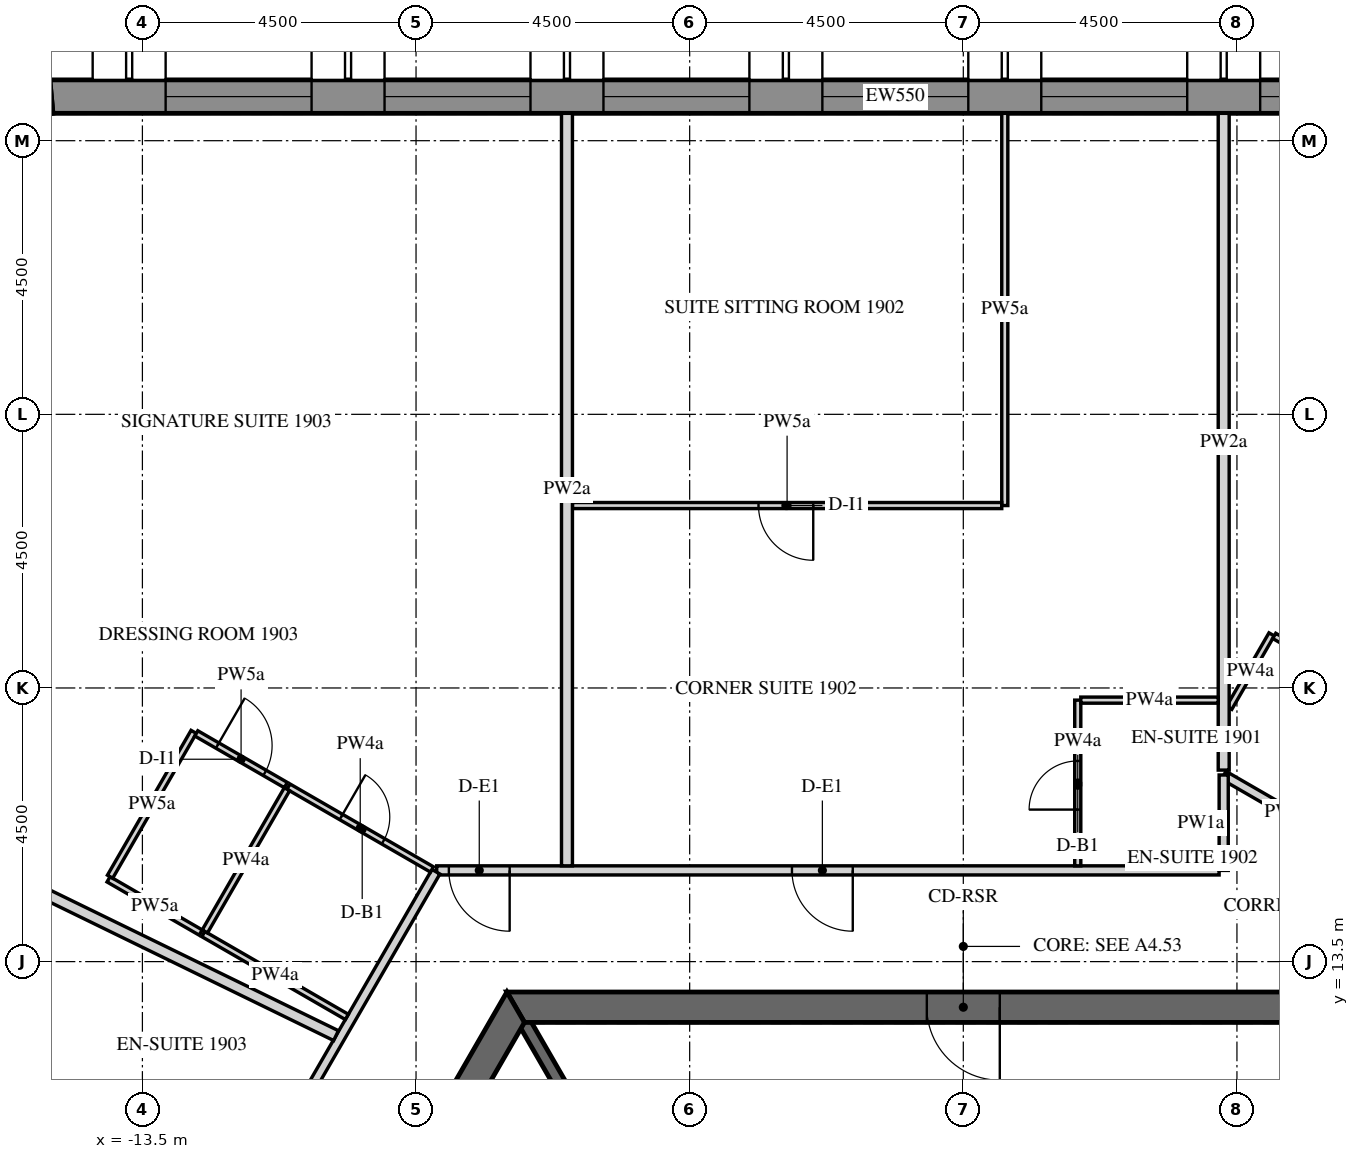
"""IFC4 building model, lengths in metres.
Left out: names, types, materials, properties, quantities, classifications, styles, units other than length and angle.
Written with IfcOpenShell. Run it as: python <this file> out.ifc"""

import sys

from ifc_helpers import new_model, si_unit, direction, frame, frame_2d, origin, place, context, subcontext, project, spatial, polyline, rectangle, outline, extrude, element, fill, save


model = new_model("IFC4")
c1 = context("Model", 3, precision=1e-05, world=origin(), true_north=direction((0.0, 1.0)))
c2 = subcontext(c1, "Body", "Model", "MODEL_VIEW")
j1 = project(units=[si_unit("LENGTHUNIT", "METRE"), si_unit("PLANEANGLEUNIT", "RADIAN")], contexts=[c1])
p1 = place(None, origin())
s1 = spatial("IfcSite", under=j1, at=p1, CompositionType="ELEMENT")
p2 = place(p1, origin())
s2 = spatial("IfcBuilding", under=s1, at=p2, CompositionType="ELEMENT")
p3 = place(p2, frame((0.0, 0.0, 238.5)))
s3 = spatial("IfcBuildingStorey", under=s2, at=p3, CompositionType="ELEMENT", Elevation=238.5)
p4 = place(p3, frame((12.761, 27.725, -0.15), z_axis=(0.0, 0.0, 1.0), x_axis=(-1.0, 0.0, 0.0)))
e1 = element("IfcWall", 1, at=p4, inside=s3, PredefinedType="SOLIDWALL", context=c2, shape_type="SweptSolid", body=[
    extrude(outline(polyline([(-0.022, -0.275), (27.783, -0.275), (27.732, 0.275), (0.022, 0.275), (-0.022, -0.275)])), origin(), (0.0, 0.0, 1.0), 3.9),
])
p5 = place(p4, frame((1.879, 0.0, 1.05)))
e2 = element("IfcOpeningElement", 2, at=p5, cuts=e1, PredefinedType="OPENING", context=c2, shape_type="SweptSolid", body=[
    extrude(rectangle(XDim=2.4, YDim=2.4, at=frame_2d((1.2, 1.2))), frame((0.0, 0.285, 0.0), z_axis=(0.0, -1.0, 0.0), x_axis=(1.0, 0.0, 0.0)), (0.0, 0.0, 1.0), 0.57),
])
p6 = place(p4, frame((5.479, 0.0, 1.05)))
e3 = element("IfcOpeningElement", 3, at=p6, cuts=e1, PredefinedType="OPENING", context=c2, shape_type="SweptSolid", body=[
    extrude(rectangle(XDim=2.4, YDim=2.4, at=frame_2d((1.2, 1.2))), frame((0.0, 0.285, 0.0), z_axis=(0.0, -1.0, 0.0), x_axis=(1.0, 0.0, 0.0)), (0.0, 0.0, 1.0), 0.57),
])
p7 = place(p4, frame((9.079, 0.0, 1.05)))
e4 = element("IfcOpeningElement", 4, at=p7, cuts=e1, PredefinedType="OPENING", context=c2, shape_type="SweptSolid", body=[
    extrude(rectangle(XDim=2.4, YDim=2.4, at=frame_2d((1.2, 1.2))), frame((0.0, 0.285, 0.0), z_axis=(0.0, -1.0, 0.0), x_axis=(1.0, 0.0, 0.0)), (0.0, 0.0, 1.0), 0.57),
])
p8 = place(p4, frame((12.679, 0.0, 1.05)))
e5 = element("IfcOpeningElement", 5, at=p8, cuts=e1, PredefinedType="OPENING", context=c2, shape_type="SweptSolid", body=[
    extrude(rectangle(XDim=2.4, YDim=2.4, at=frame_2d((1.2, 1.2))), frame((0.0, 0.285, 0.0), z_axis=(0.0, -1.0, 0.0), x_axis=(1.0, 0.0, 0.0)), (0.0, 0.0, 1.0), 0.57),
])
p9 = place(p4, frame((16.279, 0.0, 1.05)))
e6 = element("IfcOpeningElement", 6, at=p9, cuts=e1, PredefinedType="OPENING", context=c2, shape_type="SweptSolid", body=[
    extrude(rectangle(XDim=2.4, YDim=2.4, at=frame_2d((1.2, 1.2))), frame((0.0, 0.285, 0.0), z_axis=(0.0, -1.0, 0.0), x_axis=(1.0, 0.0, 0.0)), (0.0, 0.0, 1.0), 0.57),
])
p10 = place(p4, frame((19.879, 0.0, 1.05)))
e7 = element("IfcOpeningElement", 7, at=p10, cuts=e1, PredefinedType="OPENING", context=c2, shape_type="SweptSolid", body=[
    extrude(rectangle(XDim=2.4, YDim=2.4, at=frame_2d((1.2, 1.2))), frame((0.0, 0.285, 0.0), z_axis=(0.0, -1.0, 0.0), x_axis=(1.0, 0.0, 0.0)), (0.0, 0.0, 1.0), 0.57),
])
p11 = place(p4, frame((23.479, 0.0, 1.05)))
e8 = element("IfcOpeningElement", 8, at=p11, cuts=e1, PredefinedType="OPENING", context=c2, shape_type="SweptSolid", body=[
    extrude(rectangle(XDim=2.4, YDim=2.4, at=frame_2d((1.2, 1.2))), frame((0.0, 0.285, 0.0), z_axis=(0.0, -1.0, 0.0), x_axis=(1.0, 0.0, 0.0)), (0.0, 0.0, 1.0), 0.57),
])
p12 = place(p3, frame((-14.997, 27.725, -0.15), z_axis=(0.0, 0.0, 1.0), x_axis=(-0.982705443133, -0.185175624845, 0.0)))
e9 = element("IfcWall", 9, at=p12, inside=s3, PredefinedType="SOLIDWALL", context=c2, shape_type="SweptSolid", body=[
    extrude(outline(polyline([(-0.026, -0.275), (1.431, -0.275), (1.327, 0.275), (0.026, 0.275), (-0.026, -0.275)])), origin(), (0.0, 0.0, 1.0), 3.9),
])
p13 = place(p3, frame((-7.361, 12.75, -0.15), z_axis=(0.0, 0.0, 1.0), x_axis=(-0.50000571537, -0.866022103989, 0.0)))
e10 = element("IfcWall", 10, at=p13, inside=s3, PredefinedType="SHEAR", context=c2, shape_type="SweptSolid", body=[
    extrude(outline(polyline([(-0.144, -0.25), (14.867, -0.25), (14.578, 0.25), (0.144, 0.25), (-0.144, -0.25)])), origin(), (0.0, 0.0, 1.0), 3.9),
])
p14 = place(p13, frame((6.49, 0.0, 0.15)))
e11 = element("IfcOpeningElement", 11, at=p14, cuts=e10, PredefinedType="OPENING", context=c2, shape_type="SweptSolid", body=[
    extrude(rectangle(XDim=1.8, YDim=2.4, at=frame_2d((0.9, 1.2))), frame((0.0, 0.26, 0.0), z_axis=(0.0, -1.0, 0.0), x_axis=(1.0, 0.0, 0.0)), (0.0, 0.0, 1.0), 0.52),
])
p15 = place(p3, frame((7.361, 12.75, -0.15), z_axis=(0.0, 0.0, 1.0), x_axis=(-1.0, 0.0, 0.0)))
e12 = element("IfcWall", 12, at=p15, inside=s3, PredefinedType="SHEAR", context=c2, shape_type="SweptSolid", body=[
    extrude(outline(polyline([(-0.144, -0.25), (14.866, -0.25), (14.578, 0.25), (0.144, 0.25), (-0.144, -0.25)])), origin(), (0.0, 0.0, 1.0), 3.9),
])
p16 = place(p15, frame((6.761, 0.0, 0.15)))
e13 = element("IfcOpeningElement", 13, at=p16, cuts=e12, PredefinedType="OPENING", context=c2, shape_type="SweptSolid", body=[
    extrude(rectangle(XDim=1.2, YDim=2.4, at=frame_2d((0.6, 1.2))), frame((0.0, 0.26, 0.0), z_axis=(0.0, -1.0, 0.0), x_axis=(1.0, 0.0, 0.0)), (0.0, 0.0, 1.0), 0.52),
])
p17 = place(p3, frame((-5.773, 10.0, -0.15), z_axis=(0.0, 0.0, 1.0), x_axis=(-0.499995765644, 0.866027848477, 0.0)))
e14 = element("IfcWall", 14, at=p17, inside=s3, PredefinedType="SHEAR", context=c2, shape_type="SweptSolid", body=[
    extrude(rectangle(XDim=2.887, YDim=0.2, at=frame_2d((1.443, 0.0))), origin(), (0.0, 0.0, 1.0), 3.9),
])
p18 = place(p3, frame((6.403, 15.341, 0.0), z_axis=(0.0, 0.0, 1.0), x_axis=(-0.8660013066, 0.500041735226, 0.0)))
e15 = element("IfcWall", 15, at=p18, inside=s3, PredefinedType="PARTITIONING", context=c2, shape_type="SweptSolid", body=[
    extrude(rectangle(XDim=2.449, YDim=0.15, at=frame_2d((1.225, 0.0))), origin(), (0.0, 0.0, 1.0), 2.838),
])
p19 = place(p3, frame((4.207, 15.0, 0.0), z_axis=(0.0, 0.0, 1.0), x_axis=(-1.0, 0.0, 0.0)))
e16 = element("IfcWall", 16, at=p19, inside=s3, PredefinedType="PARTITIONING", context=c2, shape_type="SweptSolid", body=[
    extrude(rectangle(XDim=12.867, YDim=0.15, at=frame_2d((6.434, 0.0))), origin(), (0.0, 0.0, 1.0), 2.838),
])
p20 = place(p19, frame((6.025, 0.0, 0.0)))
e17 = element("IfcOpeningElement", 17, at=p20, cuts=e16, PredefinedType="OPENING", context=c2, shape_type="SweptSolid", body=[
    extrude(rectangle(XDim=1.0, YDim=2.1, at=frame_2d((0.5, 1.05))), frame((0.0, 0.085, 0.0), z_axis=(0.0, -1.0, 0.0), x_axis=(1.0, 0.0, 0.0)), (0.0, 0.0, 1.0), 0.17),
])
p21 = place(p19, frame((11.667, 0.0, 0.0)))
e18 = element("IfcOpeningElement", 18, at=p21, cuts=e16, PredefinedType="OPENING", context=c2, shape_type="SweptSolid", body=[
    extrude(rectangle(XDim=1.0, YDim=2.1, at=frame_2d((0.5, 1.05))), frame((0.0, 0.085, 0.0), z_axis=(0.0, -1.0, 0.0), x_axis=(1.0, 0.0, 0.0)), (0.0, 0.0, 1.0), 0.17),
])
p22 = place(p3, frame((4.282, 16.569, 0.0), z_axis=(0.0, 0.0, 1.0), x_axis=(0.0, -1.0, 0.0)))
e19 = element("IfcWall", 19, at=p22, inside=s3, PredefinedType="PARTITIONING", context=c2, shape_type="SweptSolid", body=[
    extrude(rectangle(XDim=1.569, YDim=0.15, at=frame_2d((0.785, 0.0))), origin(), (0.0, 0.0, 1.0), 2.838),
])
p23 = place(p3, frame((-8.673, 14.978, 0.0), z_axis=(0.0, 0.0, 1.0), x_axis=(-0.50000700621, -0.86602135871, 0.0)))
e20 = element("IfcWall", 20, at=p23, inside=s3, PredefinedType="PARTITIONING", context=c2, shape_type="SweptSolid", body=[
    extrude(rectangle(XDim=14.928, YDim=0.15, at=frame_2d((7.464, 0.0))), origin(), (0.0, 0.0, 1.0), 2.838),
])
p24 = place(p23, frame((4.454, 0.0, 0.0)))
e21 = element("IfcOpeningElement", 21, at=p24, cuts=e20, PredefinedType="OPENING", context=c2, shape_type="SweptSolid", body=[
    extrude(rectangle(XDim=1.0, YDim=2.1, at=frame_2d((0.5, 1.05))), frame((0.0, 0.085, 0.0), z_axis=(0.0, -1.0, 0.0), x_axis=(1.0, 0.0, 0.0)), (0.0, 0.0, 1.0), 0.17),
])
p25 = place(p23, frame((11.264, 0.0, 0.0)))
e22 = element("IfcOpeningElement", 22, at=p25, cuts=e20, PredefinedType="OPENING", context=c2, shape_type="SweptSolid", body=[
    extrude(rectangle(XDim=1.0, YDim=2.1, at=frame_2d((0.5, 1.05))), frame((0.0, 0.085, 0.0), z_axis=(0.0, -1.0, 0.0), x_axis=(1.0, 0.0, 0.0)), (0.0, 0.0, 1.0), 0.17),
])
p26 = place(p3, frame((4.372, 17.673, 0.0), z_axis=(0.0, 0.0, 1.0), x_axis=(0.50007068215, 0.86598459158, 0.0)))
e23 = element("IfcWall", 23, at=p26, inside=s3, PredefinedType="PARTITIONING", context=c2, shape_type="SweptSolid", body=[
    extrude(rectangle(XDim=1.396, YDim=0.1, at=frame_2d((0.698, 0.0))), origin(), (0.0, 0.0, 1.0), 2.838),
])
p27 = place(p3, frame((5.113, 18.857, 0.0), z_axis=(0.0, 0.0, 1.0), x_axis=(0.866039941686, -0.499974818771, 0.0)))
e24 = element("IfcWall", 24, at=p27, inside=s3, PredefinedType="PARTITIONING", context=c2, shape_type="SweptSolid", body=[
    extrude(rectangle(XDim=2.875, YDim=0.1, at=frame_2d((1.438, 0.0))), origin(), (0.0, 0.0, 1.0), 2.838),
])
p28 = place(p27, frame((1.05, 0.0, 0.0)))
e25 = element("IfcOpeningElement", 25, at=p28, cuts=e24, PredefinedType="OPENING", context=c2, shape_type="SweptSolid", body=[
    extrude(rectangle(XDim=0.8, YDim=2.1, at=frame_2d((0.4, 1.05))), frame((0.0, 0.06, 0.0), z_axis=(0.0, -1.0, 0.0), x_axis=(1.0, 0.0, 0.0)), (0.0, 0.0, 1.0), 0.12),
])
p29 = place(p3, frame((4.282, 27.45, 0.0), z_axis=(0.0, 0.0, 1.0), x_axis=(0.0, -1.0, 0.0)))
e26 = element("IfcWall", 26, at=p29, inside=s3, PredefinedType="PARTITIONING", context=c2, shape_type="SweptSolid", body=[
    extrude(rectangle(XDim=10.801, YDim=0.18, at=frame_2d((5.4, 0.0))), origin(), (0.0, 0.0, 1.0), 2.838),
])
p30 = place(p3, frame((1.882, 15.075, 0.0), z_axis=(0.0, 0.0, 1.0), x_axis=(0.0, 1.0, 0.0)))
e27 = element("IfcWall", 27, at=p30, inside=s3, PredefinedType="PARTITIONING", context=c2, shape_type="SweptSolid", body=[
    extrude(rectangle(XDim=2.725, YDim=0.1, at=frame_2d((1.363, 0.0))), origin(), (0.0, 0.0, 1.0), 2.838),
])
p31 = place(p30, frame((0.925, 0.0, 0.0)))
e28 = element("IfcOpeningElement", 28, at=p31, cuts=e27, PredefinedType="OPENING", context=c2, shape_type="SweptSolid", body=[
    extrude(rectangle(XDim=0.8, YDim=2.1, at=frame_2d((0.4, 1.05))), frame((0.0, 0.06, 0.0), z_axis=(0.0, -1.0, 0.0), x_axis=(1.0, 0.0, 0.0)), (0.0, 0.0, 1.0), 0.12),
])
p32 = place(p3, frame((1.932, 17.8, 0.0), z_axis=(0.0, 0.0, 1.0), x_axis=(1.0, 0.0, 0.0)))
e29 = element("IfcWall", 29, at=p32, inside=s3, PredefinedType="PARTITIONING", context=c2, shape_type="SweptSolid", body=[
    extrude(rectangle(XDim=2.26, YDim=0.1, at=frame_2d((1.13, 0.0))), origin(), (0.0, 0.0, 1.0), 2.838),
])
p33 = place(p3, frame((0.682, 27.45, 0.0), z_axis=(0.0, 0.0, 1.0), x_axis=(0.0, -1.0, 0.0)))
e30 = element("IfcWall", 30, at=p33, inside=s3, PredefinedType="PARTITIONING", context=c2, shape_type="SweptSolid", body=[
    extrude(rectangle(XDim=6.45, YDim=0.1, at=frame_2d((3.225, 0.0))), origin(), (0.0, 0.0, 1.0), 2.838),
])
p34 = place(p3, frame((0.632, 21.0, 0.0), z_axis=(0.0, 0.0, 1.0), x_axis=(-1.0, 0.0, 0.0)))
e31 = element("IfcWall", 31, at=p34, inside=s3, PredefinedType="PARTITIONING", context=c2, shape_type="SweptSolid", body=[
    extrude(rectangle(XDim=7.06, YDim=0.1, at=frame_2d((3.53, 0.0))), origin(), (0.0, 0.0, 1.0), 2.838),
])
p35 = place(p34, frame((3.1, 0.0, 0.0)))
e32 = element("IfcOpeningElement", 32, at=p35, cuts=e31, PredefinedType="OPENING", context=c2, shape_type="SweptSolid", body=[
    extrude(rectangle(XDim=0.9, YDim=2.1, at=frame_2d((0.45, 1.05))), frame((0.0, 0.06, 0.0), z_axis=(0.0, -1.0, 0.0), x_axis=(1.0, 0.0, 0.0)), (0.0, 0.0, 1.0), 0.12),
])
p36 = place(p3, frame((-6.518, 27.45, 0.0), z_axis=(0.0, 0.0, 1.0), x_axis=(0.0, -1.0, 0.0)))
e33 = element("IfcWall", 33, at=p36, inside=s3, PredefinedType="PARTITIONING", context=c2, shape_type="SweptSolid", body=[
    extrude(rectangle(XDim=12.375, YDim=0.18, at=frame_2d((6.188, 0.0))), origin(), (0.0, 0.0, 1.0), 2.838),
])
p37 = place(p3, frame((-10.138, 12.591, 0.0), z_axis=(0.0, 0.0, 1.0), x_axis=(-0.866051307416, 0.49995513091, 0.0)))
e34 = element("IfcWall", 34, at=p37, inside=s3, PredefinedType="PARTITIONING", context=c2, shape_type="SweptSolid", body=[
    extrude(rectangle(XDim=2.725, YDim=0.1, at=frame_2d((1.362, 0.0))), origin(), (0.0, 0.0, 1.0), 2.838),
])
p38 = place(p3, frame((-11.098, 16.378, 0.0), z_axis=(0.0, 0.0, 1.0), x_axis=(0.866012511928, -0.500022328685, 0.0)))
e35 = element("IfcWall", 35, at=p38, inside=s3, PredefinedType="PARTITIONING", context=c2, shape_type="SweptSolid", body=[
    extrude(rectangle(XDim=2.725, YDim=0.1, at=frame_2d((1.363, 0.0))), origin(), (0.0, 0.0, 1.0), 2.838),
])
p39 = place(p38, frame((1.0, 0.0, 0.0)))
e36 = element("IfcOpeningElement", 36, at=p39, cuts=e35, PredefinedType="OPENING", context=c2, shape_type="SweptSolid", body=[
    extrude(rectangle(XDim=0.8, YDim=2.1, at=frame_2d((0.4, 1.05))), frame((0.0, 0.06, 0.0), z_axis=(0.0, -1.0, 0.0), x_axis=(1.0, 0.0, 0.0)), (0.0, 0.0, 1.0), 0.12),
])
p40 = place(p3, frame((-12.541, 13.978, 0.0), z_axis=(0.0, 0.0, 1.0), x_axis=(-0.866036909293, 0.499980071345, 0.0)))
e37 = element("IfcWall", 37, at=p40, inside=s3, PredefinedType="PARTITIONING", context=c2, shape_type="SweptSolid", body=[
    extrude(rectangle(XDim=1.75, YDim=0.1, at=frame_2d((0.875, 0.0))), origin(), (0.0, 0.0, 1.0), 2.838),
])
p41 = place(p3, frame((-14.031, 14.896, 0.0), z_axis=(0.0, 0.0, 1.0), x_axis=(0.499996545922, 0.866027397988, 0.0)))
e38 = element("IfcWall", 38, at=p41, inside=s3, PredefinedType="PARTITIONING", context=c2, shape_type="SweptSolid", body=[
    extrude(rectangle(XDim=2.75, YDim=0.1, at=frame_2d((1.375, 0.0))), origin(), (0.0, 0.0, 1.0), 2.838),
])
p42 = place(p3, frame((-12.613, 17.253, 0.0), z_axis=(0.0, 0.0, 1.0), x_axis=(0.865989465428, -0.500062241894, 0.0)))
e39 = element("IfcWall", 39, at=p42, inside=s3, PredefinedType="PARTITIONING", context=c2, shape_type="SweptSolid", body=[
    extrude(rectangle(XDim=1.7, YDim=0.1, at=frame_2d((0.85, 0.0))), origin(), (0.0, 0.0, 1.0), 2.838),
])
p43 = place(p42, frame((0.4, 0.0, 0.0)))
e40 = element("IfcOpeningElement", 40, at=p43, cuts=e39, PredefinedType="OPENING", context=c2, shape_type="SweptSolid", body=[
    extrude(rectangle(XDim=0.9, YDim=2.1, at=frame_2d((0.45, 1.05))), frame((0.0, 0.06, 0.0), z_axis=(0.0, -1.0, 0.0), x_axis=(1.0, 0.0, 0.0)), (0.0, 0.0, 1.0), 0.12),
])
p44 = place(p3, frame((-21.815, 17.892, 0.0), z_axis=(0.0, 0.0, 1.0), x_axis=(0.898799253997, -0.438360469265, 0.0)))
e41 = element("IfcWall", 41, at=p44, inside=s3, PredefinedType="PARTITIONING", context=c2, shape_type="SweptSolid", body=[
    extrude(rectangle(XDim=12.794, YDim=0.18, at=frame_2d((6.397, 0.0))), origin(), (0.0, 0.0, 1.0), 2.838),
])
p45 = place(p3, frame((-11.123, 16.335, 0.0), z_axis=(0.0, 0.0, 1.0), x_axis=(-0.499980770555, -0.866036505625, 0.0)))
e42 = element("IfcWall", 42, at=p45, inside=s3, PredefinedType="PARTITIONING", context=c2, shape_type="SweptSolid", body=[
    extrude(rectangle(XDim=2.7, YDim=0.1, at=frame_2d((1.35, 0.0))), origin(), (0.0, 0.0, 1.0), 2.838),
])
p46 = place(p3, frame((-23.393, 14.656, 0.0), z_axis=(0.0, 0.0, 1.0), x_axis=(0.898790706576, -0.43837799417, 0.0)))
e43 = element("IfcWall", 43, at=p46, inside=s3, PredefinedType="PARTITIONING", context=c2, shape_type="SweptSolid", body=[
    extrude(rectangle(XDim=12.542, YDim=0.18, at=frame_2d((6.271, 0.0))), origin(), (0.0, 0.0, 1.0), 2.838),
])
p47 = place(p6, frame((0.0, 0.205, 0.0)))
e44 = element("IfcWindow", 44, at=p47, inside=s3, PartitioningType="DOUBLE_PANEL_VERTICAL", PredefinedType="WINDOW", context=c2, shape_type="SweptSolid", body=[
    extrude(rectangle(XDim=2.4, YDim=2.4, at=frame_2d((1.2, 1.2))), frame((0.0, 0.03, 0.0), z_axis=(0.0, -1.0, 0.0), x_axis=(1.0, 0.0, 0.0)), (0.0, 0.0, 1.0), 0.06),
])
fill(e3, e44)
p48 = place(p7, frame((0.0, 0.205, 0.0)))
e45 = element("IfcWindow", 45, at=p48, inside=s3, PartitioningType="DOUBLE_PANEL_VERTICAL", PredefinedType="WINDOW", context=c2, shape_type="SweptSolid", body=[
    extrude(rectangle(XDim=2.4, YDim=2.4, at=frame_2d((1.2, 1.2))), frame((0.0, 0.03, 0.0), z_axis=(0.0, -1.0, 0.0), x_axis=(1.0, 0.0, 0.0)), (0.0, 0.0, 1.0), 0.06),
])
fill(e4, e45)
p49 = place(p8, frame((0.0, 0.205, 0.0)))
e46 = element("IfcWindow", 46, at=p49, inside=s3, PartitioningType="DOUBLE_PANEL_VERTICAL", PredefinedType="WINDOW", context=c2, shape_type="SweptSolid", body=[
    extrude(rectangle(XDim=2.4, YDim=2.4, at=frame_2d((1.2, 1.2))), frame((0.0, 0.03, 0.0), z_axis=(0.0, -1.0, 0.0), x_axis=(1.0, 0.0, 0.0)), (0.0, 0.0, 1.0), 0.06),
])
fill(e5, e46)
p50 = place(p9, frame((0.0, 0.205, 0.0)))
e47 = element("IfcWindow", 47, at=p50, inside=s3, PartitioningType="DOUBLE_PANEL_VERTICAL", PredefinedType="WINDOW", context=c2, shape_type="SweptSolid", body=[
    extrude(rectangle(XDim=2.4, YDim=2.4, at=frame_2d((1.2, 1.2))), frame((0.0, 0.03, 0.0), z_axis=(0.0, -1.0, 0.0), x_axis=(1.0, 0.0, 0.0)), (0.0, 0.0, 1.0), 0.06),
])
fill(e6, e47)
p51 = place(p10, frame((0.0, 0.205, 0.0)))
e48 = element("IfcWindow", 48, at=p51, inside=s3, PartitioningType="DOUBLE_PANEL_VERTICAL", PredefinedType="WINDOW", context=c2, shape_type="SweptSolid", body=[
    extrude(rectangle(XDim=2.4, YDim=2.4, at=frame_2d((1.2, 1.2))), frame((0.0, 0.03, 0.0), z_axis=(0.0, -1.0, 0.0), x_axis=(1.0, 0.0, 0.0)), (0.0, 0.0, 1.0), 0.06),
])
fill(e7, e48)
p52 = place(p11, frame((0.0, 0.205, 0.0)))
e49 = element("IfcWindow", 49, at=p52, inside=s3, PartitioningType="DOUBLE_PANEL_VERTICAL", PredefinedType="WINDOW", context=c2, shape_type="SweptSolid", body=[
    extrude(rectangle(XDim=2.4, YDim=2.4, at=frame_2d((1.2, 1.2))), frame((0.0, 0.03, 0.0), z_axis=(0.0, -1.0, 0.0), x_axis=(1.0, 0.0, 0.0)), (0.0, 0.0, 1.0), 0.06),
])
fill(e8, e49)
p53 = place(p16, origin())
e50 = element("IfcDoor", 50, at=p53, inside=s3, OperationType="SINGLE_SWING_LEFT", PredefinedType="DOOR", context=c2, shape_type="SweptSolid", body=[
    extrude(rectangle(XDim=1.2, YDim=2.4, at=frame_2d((0.6, 1.2))), frame((0.0, 0.025, 0.0), z_axis=(0.0, -1.0, 0.0), x_axis=(1.0, 0.0, 0.0)), (0.0, 0.0, 1.0), 0.05),
])
fill(e13, e50)
p54 = place(p20, origin())
e51 = element("IfcDoor", 51, at=p54, inside=s3, OperationType="SINGLE_SWING_RIGHT", PredefinedType="DOOR", context=c2, shape_type="SweptSolid", body=[
    extrude(rectangle(XDim=1.0, YDim=2.1, at=frame_2d((0.5, 1.05))), frame((0.0, 0.025, 0.0), z_axis=(0.0, -1.0, 0.0), x_axis=(1.0, 0.0, 0.0)), (0.0, 0.0, 1.0), 0.05),
])
fill(e17, e51)
p55 = place(p31, origin())
e52 = element("IfcDoor", 52, at=p55, inside=s3, OperationType="SINGLE_SWING_RIGHT", PredefinedType="DOOR", context=c2, shape_type="SweptSolid", body=[
    extrude(rectangle(XDim=0.8, YDim=2.1, at=frame_2d((0.4, 1.05))), frame((0.0, 0.025, 0.0), z_axis=(0.0, -1.0, 0.0), x_axis=(1.0, 0.0, 0.0)), (0.0, 0.0, 1.0), 0.05),
])
fill(e28, e52)
p56 = place(p35, origin())
e53 = element("IfcDoor", 53, at=p56, inside=s3, OperationType="SINGLE_SWING_LEFT", PredefinedType="DOOR", context=c2, shape_type="SweptSolid", body=[
    extrude(rectangle(XDim=0.9, YDim=2.1, at=frame_2d((0.45, 1.05))), frame((0.0, 0.025, 0.0), z_axis=(0.0, -1.0, 0.0), x_axis=(1.0, 0.0, 0.0)), (0.0, 0.0, 1.0), 0.05),
])
fill(e32, e53)
p57 = place(p21, origin())
e54 = element("IfcDoor", 54, at=p57, inside=s3, OperationType="SINGLE_SWING_LEFT", PredefinedType="DOOR", context=c2, shape_type="SweptSolid", body=[
    extrude(rectangle(XDim=1.0, YDim=2.1, at=frame_2d((0.5, 1.05))), frame((0.0, 0.025, 0.0), z_axis=(0.0, -1.0, 0.0), x_axis=(1.0, 0.0, 0.0)), (0.0, 0.0, 1.0), 0.05),
])
fill(e18, e54)
p58 = place(p39, origin())
e55 = element("IfcDoor", 55, at=p58, inside=s3, OperationType="SINGLE_SWING_LEFT", PredefinedType="DOOR", context=c2, shape_type="SweptSolid", body=[
    extrude(rectangle(XDim=0.8, YDim=2.1, at=frame_2d((0.4, 1.05))), frame((0.0, 0.025, 0.0), z_axis=(0.0, -1.0, 0.0), x_axis=(1.0, 0.0, 0.0)), (0.0, 0.0, 1.0), 0.05),
])
fill(e36, e55)
p59 = place(p43, origin())
e56 = element("IfcDoor", 56, at=p59, inside=s3, OperationType="SINGLE_SWING_LEFT", PredefinedType="DOOR", context=c2, shape_type="SweptSolid", body=[
    extrude(rectangle(XDim=0.9, YDim=2.1, at=frame_2d((0.45, 1.05))), frame((0.0, 0.025, 0.0), z_axis=(0.0, -1.0, 0.0), x_axis=(1.0, 0.0, 0.0)), (0.0, 0.0, 1.0), 0.05),
])
fill(e40, e56)
save(model, sys.argv[1])
